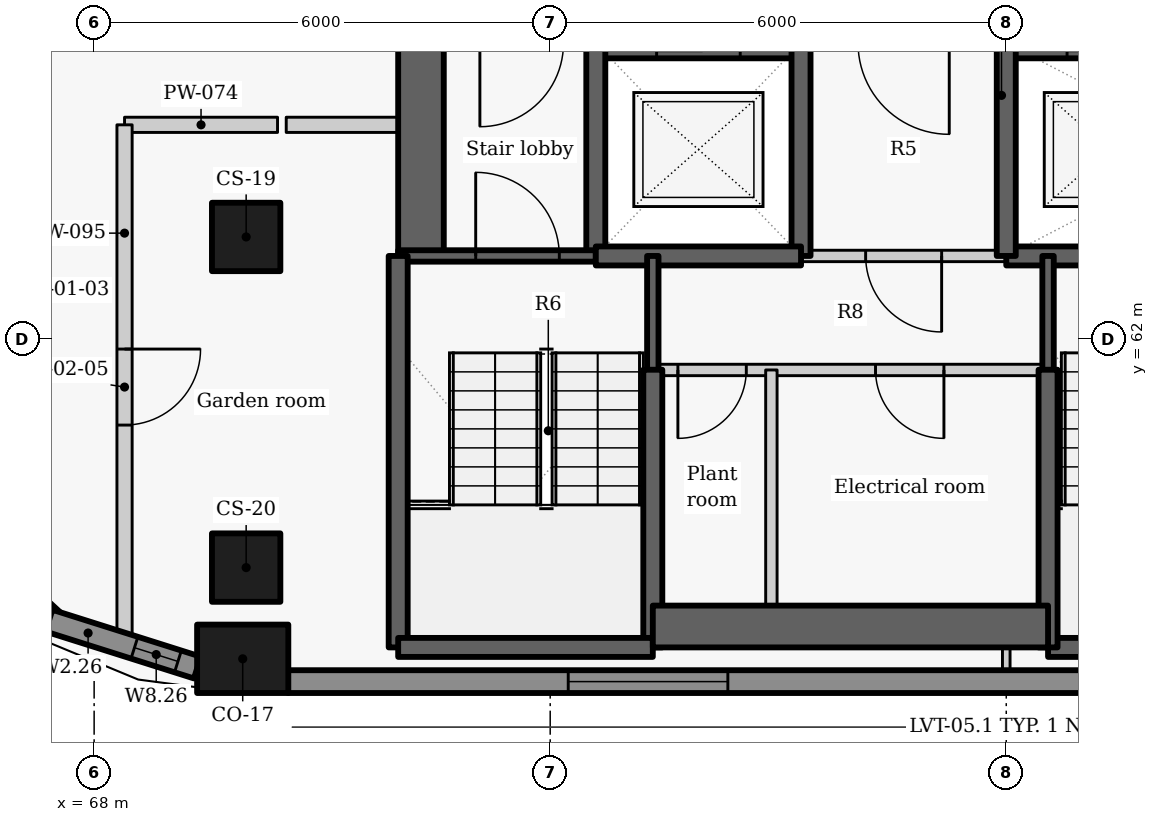
"""IFC4 building model, lengths in metres.
Left out: names, types, materials, properties, quantities, classifications, styles, units other than length and angle.
Written with IfcOpenShell. Run it as: python <this file> out.ifc"""

import sys

from ifc_helpers import new_model, si_unit, direction, frame, frame_2d, origin, origin_2d, place, context, subcontext, project, spatial, rectangle, extrude, element, fill, save


model = new_model("IFC4")
c1 = context("Model", 3, precision=1e-05, world=origin(), true_north=direction((0.0, 1.0)))
c2 = subcontext(c1, "Body", "Model", "MODEL_VIEW")
j1 = project(units=[si_unit("LENGTHUNIT", "METRE"), si_unit("PLANEANGLEUNIT", "RADIAN")], contexts=[c1])
p1 = place(None, origin())
s1 = spatial("IfcSite", under=j1, at=p1, CompositionType="ELEMENT")
p2 = place(p1, origin())
s2 = spatial("IfcBuilding", under=s1, at=p2, CompositionType="ELEMENT")
p3 = place(p2, frame((0.0, 0.0, 183.3)))
s3 = spatial("IfcBuildingStorey", under=s2, at=p3, CompositionType="ELEMENT", Elevation=183.3)
p4 = place(p3, frame((69.955, 57.8, 0.0), z_axis=(0.0, 0.0, 1.0), x_axis=(1.0, 0.0, 0.0)))
e1 = element("IfcColumn", 1, at=p4, inside=s3, PredefinedType="COLUMN", context=c2, shape_type="SweptSolid", body=[
    extrude(rectangle(XDim=1.2, YDim=0.9, at=origin_2d()), origin(), (0.0, 0.0, 1.0), 3.3),
])
for number, where, z_axis, x_axis in (
    (2, (70.0, 63.35, 0.0), (0.0, 0.0, 1.0), (0.0, -1.0, 0.0)),
    (3, (70.0, 59.0, 0.0), (0.0, 0.0, 1.0), (0.0, -1.0, 0.0)),
):
    element("IfcColumn", number, at=place(p3, frame(where, z_axis=z_axis, x_axis=x_axis)), inside=s3, PredefinedType="COLUMN", context=c2, shape_type="SweptSolid", body=[
        extrude(rectangle(XDim=0.9, YDim=0.9, at=origin_2d()), origin(), (0.0, 0.0, 1.0), 3.3),
    ])
p5 = place(p3, frame((66.022, 59.622, 0.0), z_axis=(0.0, 0.0, 1.0), x_axis=(0.734627852992, -0.678470277616, 0.0)))
e4 = element("IfcWall", 4, at=p5, inside=s3, PredefinedType="SOLIDWALL", context=c2, shape_type="SweptSolid", body=[
    extrude(rectangle(XDim=2.026, YDim=0.3, at=frame_2d((1.013, 0.0))), origin(), (0.0, 0.0, 1.0), 2.425),
])
p6 = place(p3, frame((67.406, 58.302, 0.0), z_axis=(0.0, 0.0, 1.0), x_axis=(0.953537608367, -0.301274010545, 0.0)))
e5 = element("IfcWall", 5, at=p6, inside=s3, PredefinedType="SOLIDWALL", context=c2, shape_type="SweptSolid", body=[
    extrude(rectangle(XDim=2.048, YDim=0.3, at=frame_2d((1.024, 0.0))), origin(), (0.0, 0.0, 1.0), 2.425),
])
p7 = place(p6, frame((1.18, 0.0, 0.9)))
e6 = element("IfcOpeningElement", 6, at=p7, cuts=e5, PredefinedType="OPENING", context=c2, shape_type="SweptSolid", body=[
    extrude(rectangle(XDim=0.6, YDim=1.1, at=frame_2d((0.3, 0.55))), frame((0.0, 0.16, 0.0), z_axis=(0.0, -1.0, 0.0), x_axis=(1.0, 0.0, 0.0)), (0.0, 0.0, 1.0), 0.32),
])
p8 = place(p3, frame((70.551, 57.5, 0.0), z_axis=(0.0, 0.0, 1.0), x_axis=(1.0, 0.0, 0.0)))
e7 = element("IfcWall", 7, at=p8, inside=s3, PredefinedType="SOLIDWALL", context=c2, shape_type="SweptSolid", body=[
    extrude(rectangle(XDim=18.893, YDim=0.3, at=frame_2d((9.446, 0.0))), origin(), (0.0, 0.0, 1.0), 2.425),
])
p9 = place(p8, frame((3.687, 0.0, 0.9)))
e8 = element("IfcOpeningElement", 8, at=p9, cuts=e7, PredefinedType="OPENING", context=c2, shape_type="SweptSolid", body=[
    extrude(rectangle(XDim=2.1, YDim=1.1, at=frame_2d((1.05, 0.55))), frame((0.0, 0.16, 0.0), z_axis=(0.0, -1.0, 0.0), x_axis=(1.0, 0.0, 0.0)), (0.0, 0.0, 1.0), 0.32),
])
p10 = place(p8, frame((13.109, 0.0, 0.9)))
e9 = element("IfcOpeningElement", 9, at=p10, cuts=e7, PredefinedType="OPENING", context=c2, shape_type="SweptSolid", body=[
    extrude(rectangle(XDim=2.1, YDim=1.1, at=frame_2d((1.05, 0.55))), frame((0.0, 0.16, 0.0), z_axis=(0.0, -1.0, 0.0), x_axis=(1.0, 0.0, 0.0)), (0.0, 0.0, 1.0), 0.32),
])
p11 = place(p3, frame((72.3, 63.1, -0.275), z_axis=(0.0, 0.0, 1.0), x_axis=(0.0, 1.0, 0.0)))
e10 = element("IfcWall", 10, at=p11, inside=s3, PredefinedType="SHEAR", context=c2, shape_type="SweptSolid", body=[
    extrude(rectangle(XDim=9.1, YDim=0.6, at=frame_2d((4.55, 0.0))), origin(), (0.0, 0.0, 1.0), 3.3),
])
p12 = place(p11, frame((3.748, 0.0, 0.275)))
e11 = element("IfcOpeningElement", 11, at=p12, cuts=e10, PredefinedType="OPENING", context=c2, shape_type="SweptSolid", body=[
    extrude(rectangle(XDim=1.5, YDim=2.1, at=frame_2d((0.75, 1.05))), frame((0.0, 0.31, 0.0), z_axis=(0.0, -1.0, 0.0), x_axis=(1.0, 0.0, 0.0)), (0.0, 0.0, 1.0), 0.62),
])
p13 = place(p3, frame((74.597, 65.9, -0.275), z_axis=(0.0, 0.0, 1.0), x_axis=(1.0, 0.0, 0.0)))
e12 = element("IfcWall", 12, at=p13, inside=s3, PredefinedType="SHEAR", context=c2, shape_type="SweptSolid", body=[
    extrude(rectangle(XDim=2.706, YDim=0.4, at=frame_2d((1.353, 0.0))), origin(), (0.0, 0.0, 1.0), 3.3),
])
p14 = place(p13, frame((0.803, 0.0, 0.275)))
e13 = element("IfcOpeningElement", 13, at=p14, cuts=e12, PredefinedType="OPENING", context=c2, shape_type="SweptSolid", body=[
    extrude(rectangle(XDim=1.1, YDim=2.1, at=frame_2d((0.55, 1.05))), frame((0.0, 0.21, 0.0), z_axis=(0.0, -1.0, 0.0), x_axis=(1.0, 0.0, 0.0)), (0.0, 0.0, 1.0), 0.42),
])
p15 = place(p3, frame((79.997, 65.9, -0.275), z_axis=(0.0, 0.0, 1.0), x_axis=(1.0, 0.0, 0.0)))
e14 = element("IfcWall", 14, at=p15, inside=s3, PredefinedType="SHEAR", context=c2, shape_type="SweptSolid", body=[
    extrude(rectangle(XDim=5.406, YDim=0.4, at=frame_2d((2.703, 0.0))), origin(), (0.0, 0.0, 1.0), 3.3),
])
p16 = place(p15, frame((0.803, 0.0, 0.275)))
e15 = element("IfcOpeningElement", 15, at=p16, cuts=e14, PredefinedType="OPENING", context=c2, shape_type="SweptSolid", body=[
    extrude(rectangle(XDim=1.1, YDim=2.1, at=frame_2d((0.55, 1.05))), frame((0.0, 0.21, 0.0), z_axis=(0.0, -1.0, 0.0), x_axis=(1.0, 0.0, 0.0)), (0.0, 0.0, 1.0), 0.42),
])
p17 = place(p3, frame((74.6, 63.1, -0.275), z_axis=(0.0, 0.0, 1.0), x_axis=(0.0, 1.0, 0.0)))
e16 = element("IfcWall", 16, at=p17, inside=s3, PredefinedType="SHEAR", context=c2, shape_type="SweptSolid", body=[
    extrude(rectangle(XDim=2.8, YDim=0.25, at=frame_2d((1.4, 0.0))), origin(), (0.0, 0.0, 1.0), 3.3),
])
p18 = place(p3, frame((72.0, 63.1, -0.275), z_axis=(0.0, 0.0, 1.0), x_axis=(1.0, 0.0, 0.0)))
e17 = element("IfcWall", 17, at=p18, inside=s3, PredefinedType="SHEAR", context=c2, shape_type="SweptSolid", body=[
    extrude(rectangle(XDim=2.6, YDim=0.15, at=frame_2d((1.3, 0.0))), origin(), (0.0, 0.0, 1.0), 3.3),
])
p19 = place(p18, frame((1.02, 0.0, 0.275)))
e18 = element("IfcOpeningElement", 18, at=p19, cuts=e17, PredefinedType="OPENING", context=c2, shape_type="SweptSolid", body=[
    extrude(rectangle(XDim=1.1, YDim=2.1, at=frame_2d((0.55, 1.05))), frame((0.0, 0.085, 0.0), z_axis=(0.0, -1.0, 0.0), x_axis=(1.0, 0.0, 0.0)), (0.0, 0.0, 1.0), 0.17),
])
p20 = place(p3, frame((77.3, 63.1, -0.275), z_axis=(0.0, 0.0, 1.0), x_axis=(0.0, 1.0, 0.0)))
e19 = element("IfcWall", 19, at=p20, inside=s3, PredefinedType="SHEAR", context=c2, shape_type="SweptSolid", body=[
    extrude(rectangle(XDim=2.8, YDim=0.25, at=frame_2d((1.4, 0.0))), origin(), (0.0, 0.0, 1.0), 3.3),
])
p21 = place(p3, frame((74.6, 63.1, -0.275), z_axis=(0.0, 0.0, 1.0), x_axis=(1.0, 0.0, 0.0)))
e20 = element("IfcWall", 20, at=p21, inside=s3, PredefinedType="SHEAR", context=c2, shape_type="SweptSolid", body=[
    extrude(rectangle(XDim=2.7, YDim=0.25, at=frame_2d((1.35, 0.0))), origin(), (0.0, 0.0, 1.0), 3.3),
])
p22 = place(p3, frame((80.0, 63.1, -0.275), z_axis=(0.0, 0.0, 1.0), x_axis=(1.0, 0.0, 0.0)))
e21 = element("IfcWall", 21, at=p22, inside=s3, PredefinedType="SHEAR", context=c2, shape_type="SweptSolid", body=[
    extrude(rectangle(XDim=8.0, YDim=0.25, at=frame_2d((4.0, 0.0))), origin(), (0.0, 0.0, 1.0), 3.3),
])
p23 = place(p22, frame((3.849, 0.0, 0.275)))
e22 = element("IfcOpeningElement", 22, at=p23, cuts=e21, PredefinedType="OPENING", context=c2, shape_type="SweptSolid", body=[
    extrude(rectangle(XDim=1.1, YDim=2.1, at=frame_2d((0.55, 1.05))), frame((0.0, 0.135, 0.0), z_axis=(0.0, -1.0, 0.0), x_axis=(1.0, 0.0, 0.0)), (0.0, 0.0, 1.0), 0.27),
])
p24 = place(p3, frame((80.0, 63.1, -0.275), z_axis=(0.0, 0.0, 1.0), x_axis=(0.0, 1.0, 0.0)))
e23 = element("IfcWall", 23, at=p24, inside=s3, PredefinedType="SHEAR", context=c2, shape_type="SweptSolid", body=[
    extrude(rectangle(XDim=2.8, YDim=0.25, at=frame_2d((1.4, 0.0))), origin(), (0.0, 0.0, 1.0), 3.3),
])
p25 = place(p3, frame((80.0, 63.1, 0.0), z_axis=(0.0, 0.0, 1.0), x_axis=(-1.0, 0.0, 0.0)))
e24 = element("IfcWall", 24, at=p25, inside=s3, PredefinedType="PARTITIONING", context=c2, shape_type="SweptSolid", body=[
    extrude(rectangle(XDim=2.7, YDim=0.15, at=frame_2d((1.35, 0.0))), origin(), (0.0, 0.0, 1.0), 3.025),
])
p26 = place(p25, frame((0.85, 0.0, 0.0)))
e25 = element("IfcOpeningElement", 25, at=p26, cuts=e24, PredefinedType="OPENING", context=c2, shape_type="SweptSolid", body=[
    extrude(rectangle(XDim=1.0, YDim=2.1, at=frame_2d((0.5, 1.05))), frame((0.0, 0.085, 0.0), z_axis=(0.0, -1.0, 0.0), x_axis=(1.0, 0.0, 0.0)), (0.0, 0.0, 1.0), 0.17),
])
p27 = place(p3, frame((75.35, 61.597, -0.275), z_axis=(0.0, 0.0, 1.0), x_axis=(0.0, 1.0, 0.0)))
e26 = element("IfcWall", 26, at=p27, inside=s3, PredefinedType="SHEAR", context=c2, shape_type="SweptSolid", body=[
    extrude(rectangle(XDim=1.503, YDim=0.15, at=frame_2d((0.751, 0.0))), origin(), (0.0, 0.0, 1.0), 3.3),
])
p28 = place(p3, frame((75.35, 57.95, -0.275), z_axis=(0.0, 0.0, 1.0), x_axis=(0.0, 1.0, 0.0)))
e27 = element("IfcWall", 27, at=p28, inside=s3, PredefinedType="SHEAR", context=c2, shape_type="SweptSolid", body=[
    extrude(rectangle(XDim=3.653, YDim=0.25, at=frame_2d((1.827, 0.0))), origin(), (0.0, 0.0, 1.0), 3.3),
])
p29 = place(p3, frame((72.0, 57.95, -0.275), z_axis=(0.0, 0.0, 1.0), x_axis=(0.0, 1.0, 0.0)))
e28 = element("IfcWall", 28, at=p29, inside=s3, PredefinedType="SHEAR", context=c2, shape_type="SweptSolid", body=[
    extrude(rectangle(XDim=5.15, YDim=0.25, at=frame_2d((2.575, 0.0))), origin(), (0.0, 0.0, 1.0), 3.3),
])
p30 = place(p3, frame((72.0, 57.95, -0.275), z_axis=(0.0, 0.0, 1.0), x_axis=(1.0, 0.0, 0.0)))
e29 = element("IfcWall", 29, at=p30, inside=s3, PredefinedType="SHEAR", context=c2, shape_type="SweptSolid", body=[
    extrude(rectangle(XDim=3.35, YDim=0.25, at=frame_2d((1.675, 0.0))), origin(), (0.0, 0.0, 1.0), 3.3),
])
p31 = place(p3, frame((80.55, 57.95, -0.275), z_axis=(0.0, 0.0, 1.0), x_axis=(1.0, 0.0, 0.0)))
e30 = element("IfcWall", 30, at=p31, inside=s3, PredefinedType="SHEAR", context=c2, shape_type="SweptSolid", body=[
    extrude(rectangle(XDim=2.85, YDim=0.25, at=frame_2d((1.425, 0.0))), origin(), (0.0, 0.0, 1.0), 3.3),
])
p32 = place(p3, frame((80.55, 61.597, -0.275), z_axis=(0.0, 0.0, 1.0), x_axis=(0.0, 1.0, 0.0)))
e31 = element("IfcWall", 31, at=p32, inside=s3, PredefinedType="SHEAR", context=c2, shape_type="SweptSolid", body=[
    extrude(rectangle(XDim=1.503, YDim=0.15, at=frame_2d((0.751, 0.0))), origin(), (0.0, 0.0, 1.0), 3.3),
])
p33 = place(p3, frame((80.55, 57.95, -0.275), z_axis=(0.0, 0.0, 1.0), x_axis=(0.0, 1.0, 0.0)))
e32 = element("IfcWall", 32, at=p33, inside=s3, PredefinedType="SHEAR", context=c2, shape_type="SweptSolid", body=[
    extrude(rectangle(XDim=3.653, YDim=0.25, at=frame_2d((1.827, 0.0))), origin(), (0.0, 0.0, 1.0), 3.3),
])
p34 = place(p3, frame((75.35, 58.225, -0.275), z_axis=(0.0, 0.0, 1.0), x_axis=(1.0, 0.0, 0.0)))
e33 = element("IfcWall", 33, at=p34, inside=s3, PredefinedType="SHEAR", context=c2, shape_type="SweptSolid", body=[
    extrude(rectangle(XDim=5.2, YDim=0.55, at=frame_2d((2.6, 0.0))), origin(), (0.0, 0.0, 1.0), 3.3),
])
p35 = place(p3, frame((80.55, 61.6, 0.0), z_axis=(0.0, 0.0, 1.0), x_axis=(-1.0, 0.0, 0.0)))
e34 = element("IfcWall", 34, at=p35, inside=s3, PredefinedType="PARTITIONING", context=c2, shape_type="SweptSolid", body=[
    extrude(rectangle(XDim=5.2, YDim=0.15, at=frame_2d((2.6, 0.0))), origin(), (0.0, 0.0, 1.0), 3.025),
])
p36 = place(p35, frame((3.97, 0.0, 0.0)))
e35 = element("IfcOpeningElement", 35, at=p36, cuts=e34, PredefinedType="OPENING", context=c2, shape_type="SweptSolid", body=[
    extrude(rectangle(XDim=0.9, YDim=2.1, at=frame_2d((0.45, 1.05))), frame((0.0, 0.085, 0.0), z_axis=(0.0, -1.0, 0.0), x_axis=(1.0, 0.0, 0.0)), (0.0, 0.0, 1.0), 0.17),
])
p37 = place(p35, frame((1.37, 0.0, 0.0)))
e36 = element("IfcOpeningElement", 36, at=p37, cuts=e34, PredefinedType="OPENING", context=c2, shape_type="SweptSolid", body=[
    extrude(rectangle(XDim=0.9, YDim=2.1, at=frame_2d((0.45, 1.05))), frame((0.0, 0.085, 0.0), z_axis=(0.0, -1.0, 0.0), x_axis=(1.0, 0.0, 0.0)), (0.0, 0.0, 1.0), 0.17),
])
p38 = place(p3, frame((76.91, 57.95, 0.0), z_axis=(0.0, 0.0, 1.0), x_axis=(0.0, 1.0, 0.0)))
e37 = element("IfcWall", 37, at=p38, inside=s3, PredefinedType="PARTITIONING", context=c2, shape_type="SweptSolid", body=[
    extrude(rectangle(XDim=3.65, YDim=0.15, at=frame_2d((1.825, 0.0))), origin(), (0.0, 0.0, 1.0), 3.025),
])
p39 = place(p3, frame((68.4, 64.825, 0.0), z_axis=(0.0, 0.0, 1.0), x_axis=(1.0, 0.0, 0.0)))
e38 = element("IfcWall", 38, at=p39, inside=s3, PredefinedType="PARTITIONING", context=c2, shape_type="SweptSolid", body=[
    extrude(rectangle(XDim=2.013, YDim=0.2, at=frame_2d((1.006, 0.0))), origin(), (0.0, 0.0, 1.0), 2.505),
])
p40 = place(p3, frame((70.527, 64.825, 0.0), z_axis=(0.0, 0.0, 1.0), x_axis=(1.0, 0.0, 0.0)))
e39 = element("IfcWall", 39, at=p40, inside=s3, PredefinedType="PARTITIONING", context=c2, shape_type="SweptSolid", body=[
    extrude(rectangle(XDim=1.473, YDim=0.2, at=frame_2d((0.736, 0.0))), origin(), (0.0, 0.0, 1.0), 3.025),
])
p41 = place(p3, frame((68.4, 64.825, 0.0), z_axis=(0.0, 0.0, 1.0), x_axis=(0.0, -1.0, 0.0)))
e40 = element("IfcWall", 40, at=p41, inside=s3, PredefinedType="PARTITIONING", context=c2, shape_type="SweptSolid", body=[
    extrude(rectangle(XDim=6.899, YDim=0.2, at=frame_2d((3.449, 0.0))), origin(), (0.0, 0.0, 1.0), 2.405),
])
p42 = place(p41, frame((2.95, 0.0, 0.0)))
e41 = element("IfcOpeningElement", 41, at=p42, cuts=e40, PredefinedType="OPENING", context=c2, shape_type="SweptSolid", body=[
    extrude(rectangle(XDim=1.0, YDim=2.1, at=frame_2d((0.5, 1.05))), frame((0.0, 0.11, 0.0), z_axis=(0.0, -1.0, 0.0), x_axis=(1.0, 0.0, 0.0)), (0.0, 0.0, 1.0), 0.22),
])
p43 = place(p3, frame((80.0, 57.65, 0.0), z_axis=(0.0, 0.0, 1.0), x_axis=(0.0, 1.0, 0.0)))
e42 = element("IfcWall", 42, at=p43, inside=s3, PredefinedType="PARTITIONING", context=c2, shape_type="SweptSolid", body=[
    extrude(rectangle(XDim=0.3, YDim=0.1, at=frame_2d((0.15, 0.0))), origin(), (0.0, 0.0, 1.0), 3.025),
])
p44 = place(p7, origin())
e43 = element("IfcWindow", 43, at=p44, inside=s3, PartitioningType="SINGLE_PANEL", PredefinedType="WINDOW", context=c2, shape_type="SweptSolid", body=[
    extrude(rectangle(XDim=0.6, YDim=1.1, at=frame_2d((0.3, 0.55))), frame((0.0, 0.03, 0.0), z_axis=(0.0, -1.0, 0.0), x_axis=(1.0, 0.0, 0.0)), (0.0, 0.0, 1.0), 0.06),
])
fill(e6, e43)
p45 = place(p9, origin())
e44 = element("IfcWindow", 44, at=p45, inside=s3, PartitioningType="SINGLE_PANEL", PredefinedType="WINDOW", context=c2, shape_type="SweptSolid", body=[
    extrude(rectangle(XDim=2.1, YDim=1.1, at=frame_2d((1.05, 0.55))), frame((0.0, 0.03, 0.0), z_axis=(0.0, -1.0, 0.0), x_axis=(1.0, 0.0, 0.0)), (0.0, 0.0, 1.0), 0.06),
])
fill(e8, e44)
p46 = place(p26, origin())
e45 = element("IfcDoor", 45, at=p46, inside=s3, OperationType="SINGLE_SWING_LEFT", PredefinedType="DOOR", context=c2, shape_type="SweptSolid", body=[
    extrude(rectangle(XDim=1.0, YDim=2.1, at=frame_2d((0.5, 1.05))), frame((0.0, 0.025, 0.0), z_axis=(0.0, -1.0, 0.0), x_axis=(1.0, 0.0, 0.0)), (0.0, 0.0, 1.0), 0.05),
])
fill(e25, e45)
p47 = place(p36, origin())
e46 = element("IfcDoor", 46, at=p47, inside=s3, OperationType="SINGLE_SWING_RIGHT", PredefinedType="DOOR", context=c2, shape_type="SweptSolid", body=[
    extrude(rectangle(XDim=0.9, YDim=2.1, at=frame_2d((0.45, 1.05))), frame((0.0, 0.025, 0.0), z_axis=(0.0, -1.0, 0.0), x_axis=(1.0, 0.0, 0.0)), (0.0, 0.0, 1.0), 0.05),
])
fill(e35, e46)
p48 = place(p37, origin())
e47 = element("IfcDoor", 47, at=p48, inside=s3, OperationType="SINGLE_SWING_LEFT", PredefinedType="DOOR", context=c2, shape_type="SweptSolid", body=[
    extrude(rectangle(XDim=0.9, YDim=2.1, at=frame_2d((0.45, 1.05))), frame((0.0, 0.025, 0.0), z_axis=(0.0, -1.0, 0.0), x_axis=(1.0, 0.0, 0.0)), (0.0, 0.0, 1.0), 0.05),
])
fill(e36, e47)
p49 = place(p19, origin())
e48 = element("IfcDoor", 48, at=p49, inside=s3, OperationType="SINGLE_SWING_LEFT", PredefinedType="DOOR", context=c2, shape_type="SweptSolid", body=[
    extrude(rectangle(XDim=1.1, YDim=2.1, at=frame_2d((0.55, 1.05))), frame((0.0, 0.025, 0.0), z_axis=(0.0, -1.0, 0.0), x_axis=(1.0, 0.0, 0.0)), (0.0, 0.0, 1.0), 0.05),
])
fill(e18, e48)
p50 = place(p42, origin())
e49 = element("IfcDoor", 49, at=p50, inside=s3, OperationType="SINGLE_SWING_LEFT", PredefinedType="DOOR", context=c2, shape_type="SweptSolid", body=[
    extrude(rectangle(XDim=1.0, YDim=2.1, at=frame_2d((0.5, 1.05))), frame((0.0, 0.025, 0.0), z_axis=(0.0, -1.0, 0.0), x_axis=(1.0, 0.0, 0.0)), (0.0, 0.0, 1.0), 0.05),
])
fill(e41, e49)
save(model, sys.argv[1])
